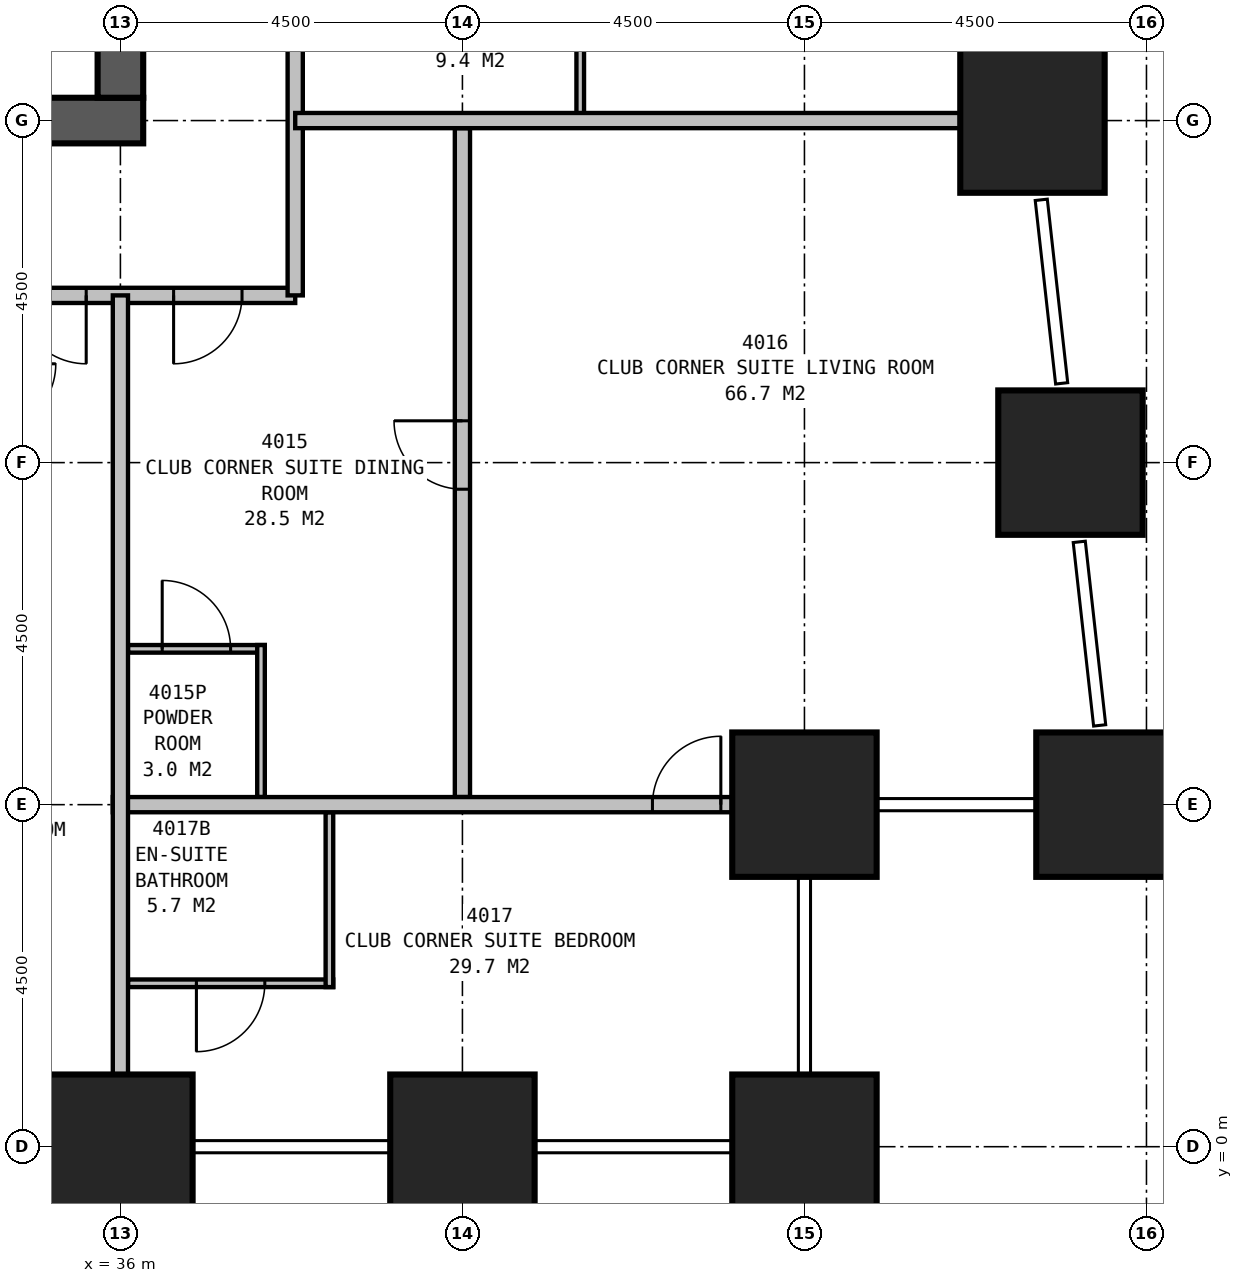
"""IFC4 building model, lengths in metres.
Left out: names, types, materials, properties, quantities, classifications, styles, units other than length and angle.
Written with IfcOpenShell. Run it as: python <this file> out.ifc"""

import sys

from ifc_helpers import new_model, si_unit, direction, frame, frame_2d, origin, origin_2d, place, context, subcontext, project, spatial, rectangle, extrude, element, fill, save


model = new_model("IFC4")
c1 = context("Model", 3, precision=1e-05, world=origin(), true_north=direction((0.0, 1.0)))
c2 = subcontext(c1, "Body", "Model", "MODEL_VIEW")
j1 = project(units=[si_unit("LENGTHUNIT", "METRE"), si_unit("PLANEANGLEUNIT", "RADIAN")], contexts=[c1])
p1 = place(None, origin())
s1 = spatial("IfcSite", under=j1, at=p1, CompositionType="ELEMENT")
p2 = place(p1, origin())
s2 = spatial("IfcBuilding", under=s1, at=p2, CompositionType="ELEMENT")
p3 = place(p2, frame((0.0, 0.0, 157.9)))
s3 = spatial("IfcBuildingStorey", under=s2, at=p3, CompositionType="ELEMENT", Elevation=157.9)
for number, where, z_axis, x_axis in (
    (1, (36.0, 0.0, 0.0), (0.0, 0.0, 1.0), (1.0, 0.0, 0.0)),
    (2, (40.5, 0.0, 0.0), (0.0, 0.0, 1.0), (1.0, 0.0, 0.0)),
    (3, (45.0, 0.0, 0.0), (0.0, 0.0, 1.0), (1.0, 0.0, 0.0)),
    (4, (45.0, 4.5, 0.0), (0.0, 0.0, 1.0), (1.0, 0.0, 0.0)),
    (5, (49.0, 4.5, 0.0), (0.0, 0.0, 1.0), (1.0, 0.0, 0.0)),
    (6, (48.5, 9.0, 0.0), (0.0, 0.0, 1.0), (1.0, 0.0, 0.0)),
    (7, (48.0, 13.5, 0.0), (0.0, 0.0, 1.0), (1.0, 0.0, 0.0)),
):
    element("IfcColumn", number, at=place(p3, frame(where, z_axis=z_axis, x_axis=x_axis)), inside=s3, PredefinedType="COLUMN", context=c2, shape_type="SweptSolid", body=[
        extrude(rectangle(XDim=1.9, YDim=1.9, at=origin_2d()), origin(), (0.0, 0.0, 1.0), 4.5),
    ])
p4 = place(p3, frame((13.2, 13.5, 0.0), z_axis=(0.0, 0.0, 1.0), x_axis=(1.0, 0.0, 0.0)))
e8 = element("IfcWall", 8, at=p4, inside=s3, PredefinedType="SHEAR", context=c2, shape_type="SweptSolid", body=[
    extrude(rectangle(XDim=23.1, YDim=0.6, at=frame_2d((11.55, 0.0))), origin(), (0.0, 0.0, 1.0), 4.5),
])
p5 = place(p3, frame((36.0, 13.8, 0.0), z_axis=(0.0, 0.0, 1.0), x_axis=(0.0, 1.0, 0.0)))
e9 = element("IfcWall", 9, at=p5, inside=s3, PredefinedType="SHEAR", context=c2, shape_type="SweptSolid", body=[
    extrude(rectangle(XDim=2.7, YDim=0.6, at=frame_2d((1.35, 0.0))), origin(), (0.0, 0.0, 1.0), 4.5),
])
p6 = place(p3, frame((11.2, 11.2, 0.0), z_axis=(0.0, 0.0, 1.0), x_axis=(1.0, 0.0, 0.0)))
e10 = element("IfcWall", 10, at=p6, inside=s3, PredefinedType="PARTITIONING", context=c2, shape_type="SweptSolid", body=[
    extrude(rectangle(XDim=27.1, YDim=0.2, at=frame_2d((13.55, 0.0))), origin(), (0.0, 0.0, 1.0), 4.25),
])
p7 = place(p6, frame((5.95, 0.0, 0.0), z_axis=(0.0, 0.0, 1.0), x_axis=(-1.0, 0.0, 0.0)))
e11 = element("IfcOpeningElement", 11, at=p7, cuts=e10, PredefinedType="OPENING", context=c2, shape_type="SweptSolid", body=[
    extrude(rectangle(XDim=0.9, YDim=2.1, at=frame_2d((0.45, 1.05))), frame((0.0, 0.11, 0.0), z_axis=(0.0, -1.0, 0.0), x_axis=(1.0, 0.0, 0.0)), (0.0, 0.0, 1.0), 0.22),
])
p8 = place(p6, frame((19.95, 0.0, 0.0), z_axis=(0.0, 0.0, 1.0), x_axis=(-1.0, 0.0, 0.0)))
e12 = element("IfcOpeningElement", 12, at=p8, cuts=e10, PredefinedType="OPENING", context=c2, shape_type="SweptSolid", body=[
    extrude(rectangle(XDim=1.0, YDim=2.1, at=frame_2d((0.5, 1.05))), frame((0.0, 0.11, 0.0), z_axis=(0.0, -1.0, 0.0), x_axis=(1.0, 0.0, 0.0)), (0.0, 0.0, 1.0), 0.22),
])
p9 = place(p6, frame((24.35, 0.0, 0.0), z_axis=(0.0, 0.0, 1.0), x_axis=(-1.0, 0.0, 0.0)))
e13 = element("IfcOpeningElement", 13, at=p9, cuts=e10, PredefinedType="OPENING", context=c2, shape_type="SweptSolid", body=[
    extrude(rectangle(XDim=0.9, YDim=2.1, at=frame_2d((0.45, 1.05))), frame((0.0, 0.11, 0.0), z_axis=(0.0, -1.0, 0.0), x_axis=(1.0, 0.0, 0.0)), (0.0, 0.0, 1.0), 0.22),
])
p10 = place(p6, frame((1.6, 0.0, 0.0), z_axis=(0.0, 0.0, 1.0), x_axis=(-1.0, 0.0, 0.0)))
e14 = element("IfcOpeningElement", 14, at=p10, cuts=e10, PredefinedType="OPENING", context=c2, shape_type="SweptSolid", body=[
    extrude(rectangle(XDim=0.9, YDim=2.1, at=frame_2d((0.45, 1.05))), frame((0.0, 0.11, 0.0), z_axis=(0.0, -1.0, 0.0), x_axis=(1.0, 0.0, 0.0)), (0.0, 0.0, 1.0), 0.22),
])
p11 = place(p6, frame((26.4, 0.0, 0.0), z_axis=(0.0, 0.0, 1.0), x_axis=(-1.0, 0.0, 0.0)))
e15 = element("IfcOpeningElement", 15, at=p11, cuts=e10, PredefinedType="OPENING", context=c2, shape_type="SweptSolid", body=[
    extrude(rectangle(XDim=0.9, YDim=2.1, at=frame_2d((0.45, 1.05))), frame((0.0, 0.11, 0.0), z_axis=(0.0, -1.0, 0.0), x_axis=(1.0, 0.0, 0.0)), (0.0, 0.0, 1.0), 0.22),
])
p12 = place(p3, frame((38.3, 11.2, 0.0), z_axis=(0.0, 0.0, 1.0), x_axis=(0.0, 1.0, 0.0)))
e16 = element("IfcWall", 16, at=p12, inside=s3, PredefinedType="PARTITIONING", context=c2, shape_type="SweptSolid", body=[
    extrude(rectangle(XDim=18.7, YDim=0.2, at=frame_2d((9.35, 0.0))), origin(), (0.0, 0.0, 1.0), 4.25),
])
p13 = place(p12, frame((6.35, 0.0, 0.0), z_axis=(0.0, 0.0, 1.0), x_axis=(-1.0, 0.0, 0.0)))
e17 = element("IfcOpeningElement", 17, at=p13, cuts=e16, PredefinedType="OPENING", context=c2, shape_type="SweptSolid", body=[
    extrude(rectangle(XDim=0.9, YDim=2.1, at=frame_2d((0.45, 1.05))), frame((0.0, 0.11, 0.0), z_axis=(0.0, -1.0, 0.0), x_axis=(1.0, 0.0, 0.0)), (0.0, 0.0, 1.0), 0.22),
])
p14 = place(p12, frame((10.45, 0.0, 0.0), z_axis=(0.0, 0.0, 1.0), x_axis=(-1.0, 0.0, 0.0)))
e18 = element("IfcOpeningElement", 18, at=p14, cuts=e16, PredefinedType="OPENING", context=c2, shape_type="SweptSolid", body=[
    extrude(rectangle(XDim=0.9, YDim=2.1, at=frame_2d((0.45, 1.05))), frame((0.0, 0.11, 0.0), z_axis=(0.0, -1.0, 0.0), x_axis=(1.0, 0.0, 0.0)), (0.0, 0.0, 1.0), 0.22),
])
p15 = place(p3, frame((42.05, 13.5, 0.0), z_axis=(0.0, 0.0, 1.0), x_axis=(0.0, 1.0, 0.0)))
e19 = element("IfcWall", 19, at=p15, inside=s3, PredefinedType="PLUMBINGWALL", context=c2, shape_type="SweptSolid", body=[
    extrude(rectangle(XDim=2.8, YDim=0.1, at=frame_2d((1.4, 0.0))), origin(), (0.0, 0.0, 1.0), 4.25),
])
p16 = place(p3, frame((38.3, 13.5, 0.0), z_axis=(0.0, 0.0, 1.0), x_axis=(1.0, 0.0, 0.0)))
e20 = element("IfcWall", 20, at=p16, inside=s3, PredefinedType="PARTITIONING", context=c2, shape_type="SweptSolid", body=[
    extrude(rectangle(XDim=9.921, YDim=0.2, at=frame_2d((4.96, 0.0))), origin(), (0.0, 0.0, 1.0), 2.95),
])
p17 = place(p3, frame((36.0, 11.2, 0.0), z_axis=(0.0, 0.0, 1.0), x_axis=(0.0, -1.0, 0.0)))
e21 = element("IfcWall", 21, at=p17, inside=s3, PredefinedType="PARTITIONING", context=c2, shape_type="SweptSolid", body=[
    extrude(rectangle(XDim=11.2, YDim=0.2, at=frame_2d((5.6, 0.0))), origin(), (0.0, 0.0, 1.0), 3.25),
])
p18 = place(p3, frame((35.9, 4.5, 0.0), z_axis=(0.0, 0.0, 1.0), x_axis=(1.0, 0.0, 0.0)))
e22 = element("IfcWall", 22, at=p18, inside=s3, PredefinedType="PARTITIONING", context=c2, shape_type="SweptSolid", body=[
    extrude(rectangle(XDim=9.1, YDim=0.2, at=frame_2d((4.55, 0.0))), origin(), (0.0, 0.0, 1.0), 4.25),
])
p19 = place(p18, frame((7.1, 0.0, 0.0)))
e23 = element("IfcOpeningElement", 23, at=p19, cuts=e22, PredefinedType="OPENING", context=c2, shape_type="SweptSolid", body=[
    extrude(rectangle(XDim=0.9, YDim=2.1, at=frame_2d((0.45, 1.05))), frame((0.0, 0.11, 0.0), z_axis=(0.0, -1.0, 0.0), x_axis=(1.0, 0.0, 0.0)), (0.0, 0.0, 1.0), 0.22),
])
p20 = place(p3, frame((40.5, 4.6, 0.0), z_axis=(0.0, 0.0, 1.0), x_axis=(0.0, 1.0, 0.0)))
e24 = element("IfcWall", 24, at=p20, inside=s3, PredefinedType="PARTITIONING", context=c2, shape_type="SweptSolid", body=[
    extrude(rectangle(XDim=8.8, YDim=0.2, at=frame_2d((4.4, 0.0))), origin(), (0.0, 0.0, 1.0), 3.25),
])
p21 = place(p20, frame((4.05, 0.0, 0.0)))
e25 = element("IfcOpeningElement", 25, at=p21, cuts=e24, PredefinedType="OPENING", context=c2, shape_type="SweptSolid", body=[
    extrude(rectangle(XDim=0.9, YDim=2.1, at=frame_2d((0.45, 1.05))), frame((0.0, 0.11, 0.0), z_axis=(0.0, -1.0, 0.0), x_axis=(1.0, 0.0, 0.0)), (0.0, 0.0, 1.0), 0.22),
])
p22 = place(p3, frame((37.85, 4.6, 0.0), z_axis=(0.0, 0.0, 1.0), x_axis=(0.0, 1.0, 0.0)))
e26 = element("IfcWall", 26, at=p22, inside=s3, PredefinedType="PLUMBINGWALL", context=c2, shape_type="SweptSolid", body=[
    extrude(rectangle(XDim=2.0, YDim=0.1, at=frame_2d((1.0, 0.0))), origin(), (0.0, 0.0, 1.0), 4.25),
])
p23 = place(p3, frame((36.1, 6.55, 0.0), z_axis=(0.0, 0.0, 1.0), x_axis=(1.0, 0.0, 0.0)))
e27 = element("IfcWall", 27, at=p23, inside=s3, PredefinedType="PLUMBINGWALL", context=c2, shape_type="SweptSolid", body=[
    extrude(rectangle(XDim=1.8, YDim=0.1, at=frame_2d((0.9, 0.0))), origin(), (0.0, 0.0, 1.0), 4.25),
])
p24 = place(p23, frame((0.45, 0.0, 0.0)))
e28 = element("IfcOpeningElement", 28, at=p24, cuts=e27, PredefinedType="OPENING", context=c2, shape_type="SweptSolid", body=[
    extrude(rectangle(XDim=0.9, YDim=2.1, at=frame_2d((0.45, 1.05))), frame((0.0, 0.06, 0.0), z_axis=(0.0, -1.0, 0.0), x_axis=(1.0, 0.0, 0.0)), (0.0, 0.0, 1.0), 0.12),
])
p25 = place(p3, frame((38.75, 4.4, 0.0), z_axis=(0.0, 0.0, 1.0), x_axis=(0.0, -1.0, 0.0)))
e29 = element("IfcWall", 29, at=p25, inside=s3, PredefinedType="PLUMBINGWALL", context=c2, shape_type="SweptSolid", body=[
    extrude(rectangle(XDim=2.3, YDim=0.1, at=frame_2d((1.15, 0.0))), origin(), (0.0, 0.0, 1.0), 4.25),
])
p26 = place(p3, frame((36.1, 2.15, 0.0), z_axis=(0.0, 0.0, 1.0), x_axis=(1.0, 0.0, 0.0)))
e30 = element("IfcWall", 30, at=p26, inside=s3, PredefinedType="PLUMBINGWALL", context=c2, shape_type="SweptSolid", body=[
    extrude(rectangle(XDim=2.7, YDim=0.1, at=frame_2d((1.35, 0.0))), origin(), (0.0, 0.0, 1.0), 4.25),
])
p27 = place(p26, frame((1.8, 0.0, 0.0), z_axis=(0.0, 0.0, 1.0), x_axis=(-1.0, 0.0, 0.0)))
e31 = element("IfcOpeningElement", 31, at=p27, cuts=e30, PredefinedType="OPENING", context=c2, shape_type="SweptSolid", body=[
    extrude(rectangle(XDim=0.9, YDim=2.1, at=frame_2d((0.45, 1.05))), frame((0.0, 0.06, 0.0), z_axis=(0.0, -1.0, 0.0), x_axis=(1.0, 0.0, 0.0)), (0.0, 0.0, 1.0), 0.12),
])
p28 = place(p9, origin())
e32 = element("IfcDoor", 32, at=p28, inside=s3, OperationType="SINGLE_SWING_LEFT", PredefinedType="DOOR", context=c2, shape_type="SweptSolid", body=[
    extrude(rectangle(XDim=0.9, YDim=2.1, at=frame_2d((0.45, 1.05))), frame((0.0, 0.025, 0.0), z_axis=(0.0, -1.0, 0.0), x_axis=(1.0, 0.0, 0.0)), (0.0, 0.0, 1.0), 0.05),
])
fill(e13, e32)
p29 = place(p11, origin())
e33 = element("IfcDoor", 33, at=p29, inside=s3, OperationType="SINGLE_SWING_RIGHT", PredefinedType="DOOR", context=c2, shape_type="SweptSolid", body=[
    extrude(rectangle(XDim=0.9, YDim=2.1, at=frame_2d((0.45, 1.05))), frame((0.0, 0.025, 0.0), z_axis=(0.0, -1.0, 0.0), x_axis=(1.0, 0.0, 0.0)), (0.0, 0.0, 1.0), 0.05),
])
fill(e15, e33)
p30 = place(p19, origin())
e34 = element("IfcDoor", 34, at=p30, inside=s3, OperationType="SINGLE_SWING_RIGHT", PredefinedType="DOOR", context=c2, shape_type="SweptSolid", body=[
    extrude(rectangle(XDim=0.9, YDim=2.1, at=frame_2d((0.45, 1.05))), frame((0.0, 0.025, 0.0), z_axis=(0.0, -1.0, 0.0), x_axis=(1.0, 0.0, 0.0)), (0.0, 0.0, 1.0), 0.05),
])
fill(e23, e34)
p31 = place(p21, origin())
e35 = element("IfcDoor", 35, at=p31, inside=s3, OperationType="SINGLE_SWING_RIGHT", PredefinedType="DOOR", context=c2, shape_type="SweptSolid", body=[
    extrude(rectangle(XDim=0.9, YDim=2.1, at=frame_2d((0.45, 1.05))), frame((0.0, 0.025, 0.0), z_axis=(0.0, -1.0, 0.0), x_axis=(1.0, 0.0, 0.0)), (0.0, 0.0, 1.0), 0.05),
])
fill(e25, e35)
p32 = place(p24, origin())
e36 = element("IfcDoor", 36, at=p32, inside=s3, OperationType="SINGLE_SWING_LEFT", PredefinedType="DOOR", context=c2, shape_type="SweptSolid", body=[
    extrude(rectangle(XDim=0.9, YDim=2.1, at=frame_2d((0.45, 1.05))), frame((0.0, 0.025, 0.0), z_axis=(0.0, -1.0, 0.0), x_axis=(1.0, 0.0, 0.0)), (0.0, 0.0, 1.0), 0.05),
])
fill(e28, e36)
p33 = place(p27, origin())
e37 = element("IfcDoor", 37, at=p33, inside=s3, OperationType="SINGLE_SWING_RIGHT", PredefinedType="DOOR", context=c2, shape_type="SweptSolid", body=[
    extrude(rectangle(XDim=0.9, YDim=2.1, at=frame_2d((0.45, 1.05))), frame((0.0, 0.025, 0.0), z_axis=(0.0, -1.0, 0.0), x_axis=(1.0, 0.0, 0.0)), (0.0, 0.0, 1.0), 0.05),
])
fill(e31, e37)
save(model, sys.argv[1])
